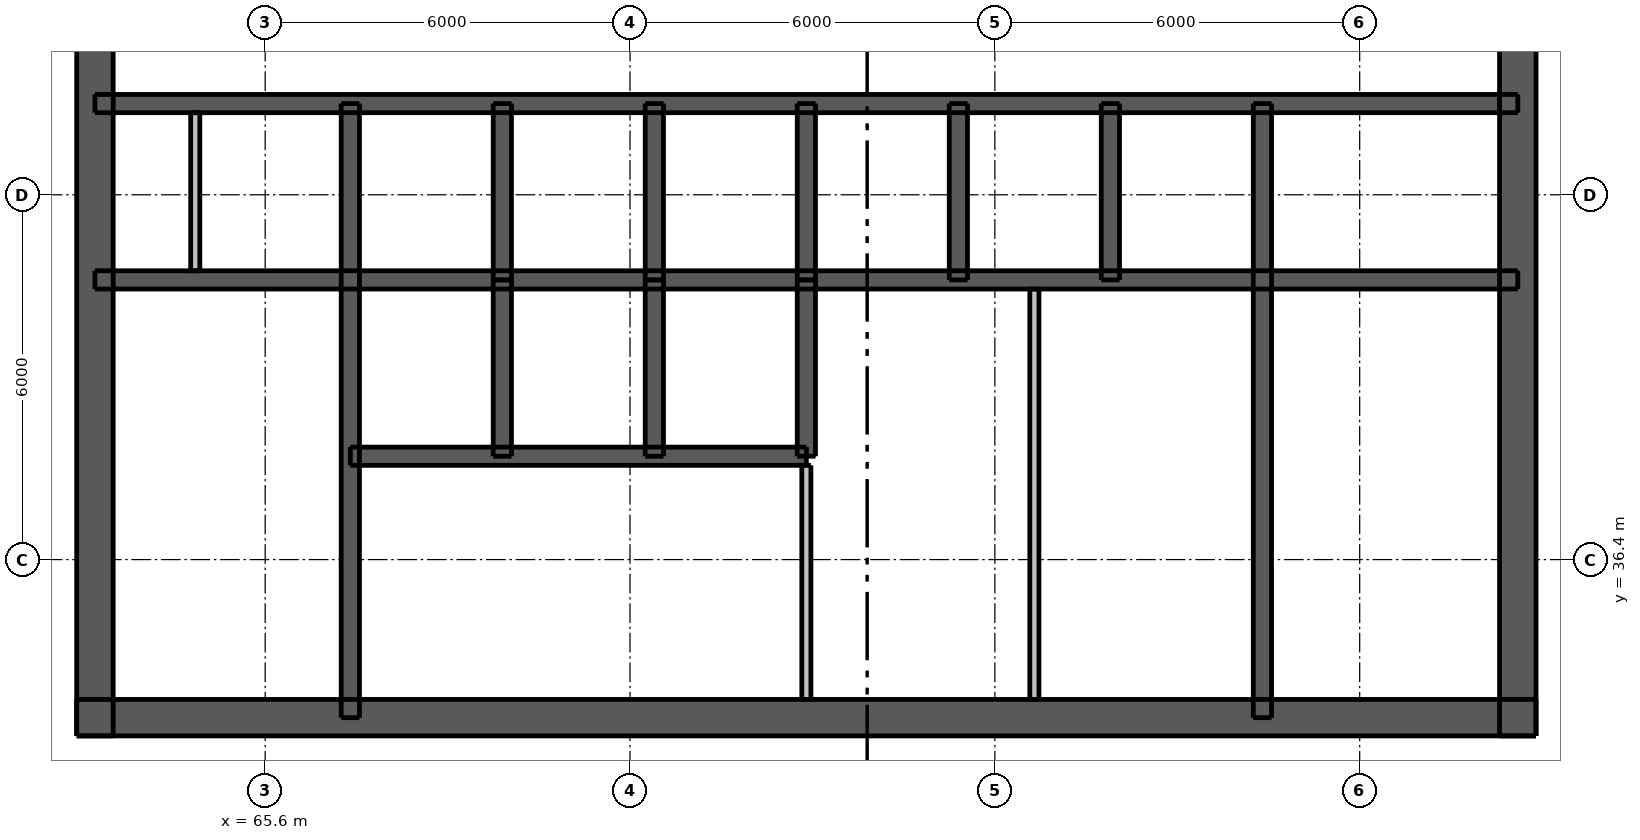
"""IFC4 building model, lengths in metres.
Left out: names, types, materials, properties, quantities, classifications, styles, units other than length and angle.
Written with IfcOpenShell. Run it as: python <this file> out.ifc"""

import sys

from ifc_helpers import new_model, si_unit, direction, frame, frame_2d, origin, place, context, subcontext, project, spatial, rectangle, extrude, element, fill, save


model = new_model("IFC4")
c1 = context("Model", 3, precision=1e-05, world=origin(), true_north=direction((0.0, 1.0)))
c2 = subcontext(c1, "Body", "Model", "MODEL_VIEW")
j1 = project(units=[si_unit("LENGTHUNIT", "METRE"), si_unit("PLANEANGLEUNIT", "RADIAN")], contexts=[c1])
p1 = place(None, origin())
s1 = spatial("IfcSite", under=j1, at=p1, CompositionType="ELEMENT")
p2 = place(p1, origin())
s2 = spatial("IfcBuilding", under=s1, at=p2, CompositionType="ELEMENT")
p3 = place(p2, frame((0.0, 0.0, 190.3)))
s3 = spatial("IfcBuildingStorey", under=s2, at=p3, CompositionType="ELEMENT", Elevation=190.3)
p4 = place(p3, frame((62.5, 33.8, 0.0), z_axis=(0.0, 0.0, 1.0), x_axis=(1.0, 0.0, 0.0)))
e1 = element("IfcWall", 1, at=p4, inside=s3, PredefinedType="SHEAR", context=c2, shape_type="SweptSolid", body=[
    extrude(rectangle(XDim=24.0, YDim=0.6, at=frame_2d((12.0, 0.0))), origin(), (0.0, 0.0, 1.0), 3.05),
])
p5 = place(p4, frame((1.925, 0.0, 0.0)))
e2 = element("IfcOpeningElement", 2, at=p5, cuts=e1, PredefinedType="OPENING", context=c2, shape_type="SweptSolid", body=[
    extrude(rectangle(XDim=1.1, YDim=2.1, at=frame_2d((0.55, 1.05))), frame((0.0, 0.31, 0.0), z_axis=(0.0, -1.0, 0.0), x_axis=(1.0, 0.0, 0.0)), (0.0, 0.0, 1.0), 0.62),
])
p6 = place(p4, frame((20.975, 0.0, 0.0)))
e3 = element("IfcOpeningElement", 3, at=p6, cuts=e1, PredefinedType="OPENING", context=c2, shape_type="SweptSolid", body=[
    extrude(rectangle(XDim=1.1, YDim=2.1, at=frame_2d((0.55, 1.05))), frame((0.0, 0.31, 0.0), z_axis=(0.0, -1.0, 0.0), x_axis=(1.0, 0.0, 0.0)), (0.0, 0.0, 1.0), 0.62),
])
p7 = place(p4, frame((8.0, 0.0, 0.0)))
e4 = element("IfcOpeningElement", 4, at=p7, cuts=e1, PredefinedType="OPENING", context=c2, shape_type="SweptSolid", body=[
    extrude(rectangle(XDim=1.1, YDim=2.1, at=frame_2d((0.55, 1.05))), frame((0.0, 0.31, 0.0), z_axis=(0.0, -1.0, 0.0), x_axis=(1.0, 0.0, 0.0)), (0.0, 0.0, 1.0), 0.62),
])
p8 = place(p4, frame((13.5, 0.0, 0.0)))
e5 = element("IfcOpeningElement", 5, at=p8, cuts=e1, PredefinedType="OPENING", context=c2, shape_type="SweptSolid", body=[
    extrude(rectangle(XDim=0.9, YDim=2.1, at=frame_2d((0.45, 1.05))), frame((0.0, 0.31, 0.0), z_axis=(0.0, -1.0, 0.0), x_axis=(1.0, 0.0, 0.0)), (0.0, 0.0, 1.0), 0.62),
])
p9 = place(p4, frame((17.1, 0.0, 0.0)))
e6 = element("IfcOpeningElement", 6, at=p9, cuts=e1, PredefinedType="OPENING", context=c2, shape_type="SweptSolid", body=[
    extrude(rectangle(XDim=0.9, YDim=2.1, at=frame_2d((0.45, 1.05))), frame((0.0, 0.31, 0.0), z_axis=(0.0, -1.0, 0.0), x_axis=(1.0, 0.0, 0.0)), (0.0, 0.0, 1.0), 0.62),
])
p10 = place(p3, frame((62.8, 33.5, 0.0), z_axis=(0.0, 0.0, 1.0), x_axis=(0.0, 1.0, 0.0)))
e7 = element("IfcWall", 7, at=p10, inside=s3, PredefinedType="SHEAR", context=c2, shape_type="SweptSolid", body=[
    extrude(rectangle(XDim=24.0, YDim=0.6, at=frame_2d((12.0, 0.0))), origin(), (0.0, 0.0, 1.0), 3.05),
])
p11 = place(p10, frame((11.2, 0.0, 0.0)))
e8 = element("IfcOpeningElement", 8, at=p11, cuts=e7, PredefinedType="OPENING", context=c2, shape_type="SweptSolid", body=[
    extrude(rectangle(XDim=1.6, YDim=2.1, at=frame_2d((0.8, 1.05))), frame((0.0, 0.31, 0.0), z_axis=(0.0, -1.0, 0.0), x_axis=(1.0, 0.0, 0.0)), (0.0, 0.0, 1.0), 0.62),
])
p12 = place(p3, frame((86.2, 33.5, 0.0), z_axis=(0.0, 0.0, 1.0), x_axis=(0.0, 1.0, 0.0)))
e9 = element("IfcWall", 9, at=p12, inside=s3, PredefinedType="SHEAR", context=c2, shape_type="SweptSolid", body=[
    extrude(rectangle(XDim=24.0, YDim=0.6, at=frame_2d((12.0, 0.0))), origin(), (0.0, 0.0, 1.0), 3.05),
])
p13 = place(p12, frame((11.2, 0.0, 0.0)))
e10 = element("IfcOpeningElement", 10, at=p13, cuts=e9, PredefinedType="OPENING", context=c2, shape_type="SweptSolid", body=[
    extrude(rectangle(XDim=1.6, YDim=2.1, at=frame_2d((0.8, 1.05))), frame((0.0, 0.31, 0.0), z_axis=(0.0, -1.0, 0.0), x_axis=(1.0, 0.0, 0.0)), (0.0, 0.0, 1.0), 0.62),
])
p14 = place(p3, frame((62.8, 41.0, 0.0), z_axis=(0.0, 0.0, 1.0), x_axis=(1.0, 0.0, 0.0)))
e11 = element("IfcWall", 11, at=p14, inside=s3, PredefinedType="SHEAR", context=c2, shape_type="SweptSolid", body=[
    extrude(rectangle(XDim=23.4, YDim=0.3, at=frame_2d((11.7, 0.0))), origin(), (0.0, 0.0, 1.0), 3.05),
])
p15 = place(p3, frame((62.8, 43.9, 0.0), z_axis=(0.0, 0.0, 1.0), x_axis=(1.0, 0.0, 0.0)))
e12 = element("IfcWall", 12, at=p15, inside=s3, PredefinedType="SHEAR", context=c2, shape_type="SweptSolid", body=[
    extrude(rectangle(XDim=23.4, YDim=0.3, at=frame_2d((11.7, 0.0))), origin(), (0.0, 0.0, 1.0), 3.05),
])
p16 = place(p15, frame((0.575, 0.0, 0.0)))
e13 = element("IfcOpeningElement", 13, at=p16, cuts=e12, PredefinedType="OPENING", context=c2, shape_type="SweptSolid", body=[
    extrude(rectangle(XDim=0.8, YDim=2.1, at=frame_2d((0.4, 1.05))), frame((0.0, 0.16, 0.0), z_axis=(0.0, -1.0, 0.0), x_axis=(1.0, 0.0, 0.0)), (0.0, 0.0, 1.0), 0.32),
])
p17 = place(p15, frame((2.4, 0.0, 0.0)))
e14 = element("IfcOpeningElement", 14, at=p17, cuts=e12, PredefinedType="OPENING", context=c2, shape_type="SweptSolid", body=[
    extrude(rectangle(XDim=0.9, YDim=2.1, at=frame_2d((0.45, 1.05))), frame((0.0, 0.16, 0.0), z_axis=(0.0, -1.0, 0.0), x_axis=(1.0, 0.0, 0.0)), (0.0, 0.0, 1.0), 0.32),
])
p18 = place(p15, frame((20.775, 0.0, 0.0)))
e15 = element("IfcOpeningElement", 15, at=p18, cuts=e12, PredefinedType="OPENING", context=c2, shape_type="SweptSolid", body=[
    extrude(rectangle(XDim=0.9, YDim=2.1, at=frame_2d((0.45, 1.05))), frame((0.0, 0.16, 0.0), z_axis=(0.0, -1.0, 0.0), x_axis=(1.0, 0.0, 0.0)), (0.0, 0.0, 1.0), 0.32),
])
p19 = place(p15, frame((7.5, 0.0, 0.0)))
e16 = element("IfcOpeningElement", 16, at=p19, cuts=e12, PredefinedType="OPENING", context=c2, shape_type="SweptSolid", body=[
    extrude(rectangle(XDim=0.9, YDim=2.1, at=frame_2d((0.45, 1.05))), frame((0.0, 0.16, 0.0), z_axis=(0.0, -1.0, 0.0), x_axis=(1.0, 0.0, 0.0)), (0.0, 0.0, 1.0), 0.32),
])
p20 = place(p15, frame((10.0, 0.0, 0.0)))
e17 = element("IfcOpeningElement", 17, at=p20, cuts=e12, PredefinedType="OPENING", context=c2, shape_type="SweptSolid", body=[
    extrude(rectangle(XDim=0.9, YDim=2.1, at=frame_2d((0.45, 1.05))), frame((0.0, 0.16, 0.0), z_axis=(0.0, -1.0, 0.0), x_axis=(1.0, 0.0, 0.0)), (0.0, 0.0, 1.0), 0.32),
])
p21 = place(p15, frame((15.0, 0.0, 0.0)))
e18 = element("IfcOpeningElement", 18, at=p21, cuts=e12, PredefinedType="OPENING", context=c2, shape_type="SweptSolid", body=[
    extrude(rectangle(XDim=0.9, YDim=2.1, at=frame_2d((0.45, 1.05))), frame((0.0, 0.16, 0.0), z_axis=(0.0, -1.0, 0.0), x_axis=(1.0, 0.0, 0.0)), (0.0, 0.0, 1.0), 0.32),
])
p22 = place(p15, frame((17.5, 0.0, 0.0)))
e19 = element("IfcOpeningElement", 19, at=p22, cuts=e12, PredefinedType="OPENING", context=c2, shape_type="SweptSolid", body=[
    extrude(rectangle(XDim=0.9, YDim=2.1, at=frame_2d((0.45, 1.05))), frame((0.0, 0.16, 0.0), z_axis=(0.0, -1.0, 0.0), x_axis=(1.0, 0.0, 0.0)), (0.0, 0.0, 1.0), 0.32),
])
p23 = place(p3, frame((67.0, 33.8, 0.0), z_axis=(0.0, 0.0, 1.0), x_axis=(0.0, 1.0, 0.0)))
e20 = element("IfcWall", 20, at=p23, inside=s3, PredefinedType="SHEAR", context=c2, shape_type="SweptSolid", body=[
    extrude(rectangle(XDim=10.1, YDim=0.3, at=frame_2d((5.05, 0.0))), origin(), (0.0, 0.0, 1.0), 3.05),
])
p24 = place(p23, frame((0.5, 0.0, 0.0)))
e21 = element("IfcOpeningElement", 21, at=p24, cuts=e20, PredefinedType="OPENING", context=c2, shape_type="SweptSolid", body=[
    extrude(rectangle(XDim=1.1, YDim=2.1, at=frame_2d((0.55, 1.05))), frame((0.0, 0.16, 0.0), z_axis=(0.0, -1.0, 0.0), x_axis=(1.0, 0.0, 0.0)), (0.0, 0.0, 1.0), 0.32),
])
p25 = place(p3, frame((82.0, 33.8, 0.0), z_axis=(0.0, 0.0, 1.0), x_axis=(0.0, 1.0, 0.0)))
e22 = element("IfcWall", 22, at=p25, inside=s3, PredefinedType="SHEAR", context=c2, shape_type="SweptSolid", body=[
    extrude(rectangle(XDim=10.1, YDim=0.3, at=frame_2d((5.05, 0.0))), origin(), (0.0, 0.0, 1.0), 3.05),
])
for number, where, z_axis, x_axis in (
    (23, (69.5, 41.0, 0.0), (0.0, 0.0, 1.0), (0.0, 1.0, 0.0)),
    (24, (72.0, 41.0, 0.0), (0.0, 0.0, 1.0), (0.0, 1.0, 0.0)),
    (25, (74.5, 41.0, 0.0), (0.0, 0.0, 1.0), (0.0, 1.0, 0.0)),
    (26, (77.0, 41.0, 0.0), (0.0, 0.0, 1.0), (0.0, 1.0, 0.0)),
    (27, (79.5, 41.0, 0.0), (0.0, 0.0, 1.0), (0.0, 1.0, 0.0)),
):
    element("IfcWall", number, at=place(p3, frame(where, z_axis=z_axis, x_axis=x_axis)), inside=s3, PredefinedType="SHEAR", context=c2, shape_type="SweptSolid", body=[
        extrude(rectangle(XDim=2.9, YDim=0.3, at=frame_2d((1.45, 0.0))), origin(), (0.0, 0.0, 1.0), 3.05),
    ])
p26 = place(p3, frame((67.0, 38.1, 0.0), z_axis=(0.0, 0.0, 1.0), x_axis=(1.0, 0.0, 0.0)))
e28 = element("IfcWall", 28, at=p26, inside=s3, PredefinedType="SHEAR", context=c2, shape_type="SweptSolid", body=[
    extrude(rectangle(XDim=7.5, YDim=0.3, at=frame_2d((3.75, 0.0))), origin(), (0.0, 0.0, 1.0), 3.05),
])
p27 = place(p26, frame((0.7, 0.0, 0.0)))
e29 = element("IfcOpeningElement", 29, at=p27, cuts=e28, PredefinedType="OPENING", context=c2, shape_type="SweptSolid", body=[
    extrude(rectangle(XDim=1.1, YDim=2.1, at=frame_2d((0.55, 1.05))), frame((0.0, 0.16, 0.0), z_axis=(0.0, -1.0, 0.0), x_axis=(1.0, 0.0, 0.0)), (0.0, 0.0, 1.0), 0.32),
])
p28 = place(p26, frame((3.2, 0.0, 0.0)))
e30 = element("IfcOpeningElement", 30, at=p28, cuts=e28, PredefinedType="OPENING", context=c2, shape_type="SweptSolid", body=[
    extrude(rectangle(XDim=1.1, YDim=2.1, at=frame_2d((0.55, 1.05))), frame((0.0, 0.16, 0.0), z_axis=(0.0, -1.0, 0.0), x_axis=(1.0, 0.0, 0.0)), (0.0, 0.0, 1.0), 0.32),
])
p29 = place(p26, frame((5.65, 0.0, 0.0)))
e31 = element("IfcOpeningElement", 31, at=p29, cuts=e28, PredefinedType="OPENING", context=c2, shape_type="SweptSolid", body=[
    extrude(rectangle(XDim=1.2, YDim=2.1, at=frame_2d((0.6, 1.05))), frame((0.0, 0.16, 0.0), z_axis=(0.0, -1.0, 0.0), x_axis=(1.0, 0.0, 0.0)), (0.0, 0.0, 1.0), 0.32),
])
for number, where, z_axis, x_axis in (
    (32, (69.5, 38.1, 0.0), (0.0, 0.0, 1.0), (0.0, 1.0, 0.0)),
    (33, (72.0, 38.1, 0.0), (0.0, 0.0, 1.0), (0.0, 1.0, 0.0)),
    (34, (74.5, 38.1, 0.0), (0.0, 0.0, 1.0), (0.0, 1.0, 0.0)),
):
    element("IfcWall", number, at=place(p3, frame(where, z_axis=z_axis, x_axis=x_axis)), inside=s3, PredefinedType="SHEAR", context=c2, shape_type="SweptSolid", body=[
        extrude(rectangle(XDim=2.9, YDim=0.3, at=frame_2d((1.45, 0.0))), origin(), (0.0, 0.0, 1.0), 3.05),
    ])
p30 = place(p3, frame((74.5, 34.1, 0.0), z_axis=(0.0, 0.0, 1.0), x_axis=(0.0, 1.0, 0.0)))
e35 = element("IfcWall", 35, at=p30, inside=s3, PredefinedType="PLUMBINGWALL", context=c2, shape_type="SweptSolid", body=[
    extrude(rectangle(XDim=3.85, YDim=0.15, at=frame_2d((1.925, 0.0))), origin(), (0.0, 0.0, 1.0), 3.05),
])
p31 = place(p3, frame((78.25, 34.1, 0.0), z_axis=(0.0, 0.0, 1.0), x_axis=(0.0, 1.0, 0.0)))
e36 = element("IfcWall", 36, at=p31, inside=s3, PredefinedType="PLUMBINGWALL", context=c2, shape_type="SweptSolid", body=[
    extrude(rectangle(XDim=6.75, YDim=0.15, at=frame_2d((3.375, 0.0))), origin(), (0.0, 0.0, 1.0), 3.05),
])
p32 = place(p3, frame((64.45, 41.15, 0.0), z_axis=(0.0, 0.0, 1.0), x_axis=(0.0, 1.0, 0.0)))
e37 = element("IfcWall", 37, at=p32, inside=s3, PredefinedType="PLUMBINGWALL", context=c2, shape_type="SweptSolid", body=[
    extrude(rectangle(XDim=2.6, YDim=0.15, at=frame_2d((1.3, 0.0))), origin(), (0.0, 0.0, 1.0), 3.05),
])
p33 = place(p5, origin())
e38 = element("IfcDoor", 38, at=p33, inside=s3, OperationType="SINGLE_SWING_LEFT", PredefinedType="DOOR", context=c2, shape_type="SweptSolid", body=[
    extrude(rectangle(XDim=1.1, YDim=2.1, at=frame_2d((0.55, 1.05))), frame((0.0, 0.288, 0.0), z_axis=(0.0, -1.0, 0.0), x_axis=(1.0, 0.0, 0.0)), (0.0, 0.0, 1.0), 0.05),
])
fill(e2, e38)
p34 = place(p6, origin())
e39 = element("IfcDoor", 39, at=p34, inside=s3, OperationType="SINGLE_SWING_RIGHT", PredefinedType="DOOR", context=c2, shape_type="SweptSolid", body=[
    extrude(rectangle(XDim=1.1, YDim=2.1, at=frame_2d((0.55, 1.05))), frame((0.0, 0.288, 0.0), z_axis=(0.0, -1.0, 0.0), x_axis=(1.0, 0.0, 0.0)), (0.0, 0.0, 1.0), 0.05),
])
fill(e3, e39)
p35 = place(p11, origin())
e40 = element("IfcDoor", 40, at=p35, inside=s3, OperationType="DOUBLE_DOOR_SINGLE_SWING", PredefinedType="DOOR", context=c2, shape_type="SweptSolid", body=[
    extrude(rectangle(XDim=1.6, YDim=2.1, at=frame_2d((0.8, 1.05))), frame((0.0, -0.237, 0.0), z_axis=(0.0, -1.0, 0.0), x_axis=(1.0, 0.0, 0.0)), (0.0, 0.0, 1.0), 0.05),
])
fill(e8, e40)
p36 = place(p13, origin())
e41 = element("IfcDoor", 41, at=p36, inside=s3, OperationType="DOUBLE_DOOR_SINGLE_SWING", PredefinedType="DOOR", context=c2, shape_type="SweptSolid", body=[
    extrude(rectangle(XDim=1.6, YDim=2.1, at=frame_2d((0.8, 1.05))), frame((0.0, 0.288, 0.0), z_axis=(0.0, -1.0, 0.0), x_axis=(1.0, 0.0, 0.0)), (0.0, 0.0, 1.0), 0.05),
])
fill(e10, e41)
p37 = place(p7, origin())
e42 = element("IfcDoor", 42, at=p37, inside=s3, OperationType="SINGLE_SWING_LEFT", PredefinedType="DOOR", context=c2, shape_type="SweptSolid", body=[
    extrude(rectangle(XDim=1.1, YDim=2.1, at=frame_2d((0.55, 1.05))), frame((0.0, 0.288, 0.0), z_axis=(0.0, -1.0, 0.0), x_axis=(1.0, 0.0, 0.0)), (0.0, 0.0, 1.0), 0.05),
])
fill(e4, e42)
p38 = place(p24, origin())
e43 = element("IfcDoor", 43, at=p38, inside=s3, OperationType="SINGLE_SWING_RIGHT", PredefinedType="DOOR", context=c2, shape_type="SweptSolid", body=[
    extrude(rectangle(XDim=1.1, YDim=2.1, at=frame_2d((0.55, 1.05))), frame((0.0, -0.087, 0.0), z_axis=(0.0, -1.0, 0.0), x_axis=(1.0, 0.0, 0.0)), (0.0, 0.0, 1.0), 0.05),
])
fill(e21, e43)
p39 = place(p8, origin())
e44 = element("IfcDoor", 44, at=p39, inside=s3, OperationType="SINGLE_SWING_LEFT", PredefinedType="DOOR", context=c2, shape_type="SweptSolid", body=[
    extrude(rectangle(XDim=0.9, YDim=2.1, at=frame_2d((0.45, 1.05))), frame((0.0, 0.288, 0.0), z_axis=(0.0, -1.0, 0.0), x_axis=(1.0, 0.0, 0.0)), (0.0, 0.0, 1.0), 0.05),
])
fill(e5, e44)
p40 = place(p9, origin())
e45 = element("IfcDoor", 45, at=p40, inside=s3, OperationType="SINGLE_SWING_LEFT", PredefinedType="DOOR", context=c2, shape_type="SweptSolid", body=[
    extrude(rectangle(XDim=0.9, YDim=2.1, at=frame_2d((0.45, 1.05))), frame((0.0, 0.288, 0.0), z_axis=(0.0, -1.0, 0.0), x_axis=(1.0, 0.0, 0.0)), (0.0, 0.0, 1.0), 0.05),
])
fill(e6, e45)
p41 = place(p16, origin())
e46 = element("IfcDoor", 46, at=p41, inside=s3, OperationType="SINGLE_SWING_LEFT", PredefinedType="DOOR", context=c2, shape_type="SweptSolid", body=[
    extrude(rectangle(XDim=0.8, YDim=2.1, at=frame_2d((0.4, 1.05))), frame((0.0, -0.087, 0.0), z_axis=(0.0, -1.0, 0.0), x_axis=(1.0, 0.0, 0.0)), (0.0, 0.0, 1.0), 0.05),
])
fill(e13, e46)
p42 = place(p17, origin())
e47 = element("IfcDoor", 47, at=p42, inside=s3, OperationType="SINGLE_SWING_RIGHT", PredefinedType="DOOR", context=c2, shape_type="SweptSolid", body=[
    extrude(rectangle(XDim=0.9, YDim=2.1, at=frame_2d((0.45, 1.05))), frame((0.0, -0.087, 0.0), z_axis=(0.0, -1.0, 0.0), x_axis=(1.0, 0.0, 0.0)), (0.0, 0.0, 1.0), 0.05),
])
fill(e14, e47)
p43 = place(p18, origin())
e48 = element("IfcDoor", 48, at=p43, inside=s3, OperationType="SINGLE_SWING_LEFT", PredefinedType="DOOR", context=c2, shape_type="SweptSolid", body=[
    extrude(rectangle(XDim=0.9, YDim=2.1, at=frame_2d((0.45, 1.05))), frame((0.0, -0.087, 0.0), z_axis=(0.0, -1.0, 0.0), x_axis=(1.0, 0.0, 0.0)), (0.0, 0.0, 1.0), 0.05),
])
fill(e15, e48)
p44 = place(p19, origin())
e49 = element("IfcDoor", 49, at=p44, inside=s3, OperationType="SINGLE_SWING_LEFT", PredefinedType="DOOR", context=c2, shape_type="SweptSolid", body=[
    extrude(rectangle(XDim=0.9, YDim=2.1, at=frame_2d((0.45, 1.05))), frame((0.0, -0.087, 0.0), z_axis=(0.0, -1.0, 0.0), x_axis=(1.0, 0.0, 0.0)), (0.0, 0.0, 1.0), 0.05),
])
fill(e16, e49)
p45 = place(p20, origin())
e50 = element("IfcDoor", 50, at=p45, inside=s3, OperationType="SINGLE_SWING_RIGHT", PredefinedType="DOOR", context=c2, shape_type="SweptSolid", body=[
    extrude(rectangle(XDim=0.9, YDim=2.1, at=frame_2d((0.45, 1.05))), frame((0.0, -0.087, 0.0), z_axis=(0.0, -1.0, 0.0), x_axis=(1.0, 0.0, 0.0)), (0.0, 0.0, 1.0), 0.05),
])
fill(e17, e50)
p46 = place(p21, origin())
e51 = element("IfcDoor", 51, at=p46, inside=s3, OperationType="SINGLE_SWING_RIGHT", PredefinedType="DOOR", context=c2, shape_type="SweptSolid", body=[
    extrude(rectangle(XDim=0.9, YDim=2.1, at=frame_2d((0.45, 1.05))), frame((0.0, -0.087, 0.0), z_axis=(0.0, -1.0, 0.0), x_axis=(1.0, 0.0, 0.0)), (0.0, 0.0, 1.0), 0.05),
])
fill(e18, e51)
p47 = place(p22, origin())
e52 = element("IfcDoor", 52, at=p47, inside=s3, OperationType="SINGLE_SWING_LEFT", PredefinedType="DOOR", context=c2, shape_type="SweptSolid", body=[
    extrude(rectangle(XDim=0.9, YDim=2.1, at=frame_2d((0.45, 1.05))), frame((0.0, -0.087, 0.0), z_axis=(0.0, -1.0, 0.0), x_axis=(1.0, 0.0, 0.0)), (0.0, 0.0, 1.0), 0.05),
])
fill(e19, e52)
p48 = place(p27, origin())
e53 = element("IfcDoor", 53, at=p48, inside=s3, OperationType="DOUBLE_DOOR_SLIDING", PredefinedType="DOOR", context=c2, shape_type="SweptSolid", body=[
    extrude(rectangle(XDim=1.1, YDim=2.1, at=frame_2d((0.55, 1.05))), frame((0.0, 0.025, 0.0), z_axis=(0.0, -1.0, 0.0), x_axis=(1.0, 0.0, 0.0)), (0.0, 0.0, 1.0), 0.05),
])
fill(e29, e53)
p49 = place(p28, origin())
e54 = element("IfcDoor", 54, at=p49, inside=s3, OperationType="DOUBLE_DOOR_SLIDING", PredefinedType="DOOR", context=c2, shape_type="SweptSolid", body=[
    extrude(rectangle(XDim=1.1, YDim=2.1, at=frame_2d((0.55, 1.05))), frame((0.0, 0.025, 0.0), z_axis=(0.0, -1.0, 0.0), x_axis=(1.0, 0.0, 0.0)), (0.0, 0.0, 1.0), 0.05),
])
fill(e30, e54)
p50 = place(p29, origin())
e55 = element("IfcDoor", 55, at=p50, inside=s3, OperationType="DOUBLE_DOOR_SLIDING", PredefinedType="DOOR", context=c2, shape_type="SweptSolid", body=[
    extrude(rectangle(XDim=1.2, YDim=2.1, at=frame_2d((0.6, 1.05))), frame((0.0, 0.025, 0.0), z_axis=(0.0, -1.0, 0.0), x_axis=(1.0, 0.0, 0.0)), (0.0, 0.0, 1.0), 0.05),
])
fill(e31, e55)
save(model, sys.argv[1])
